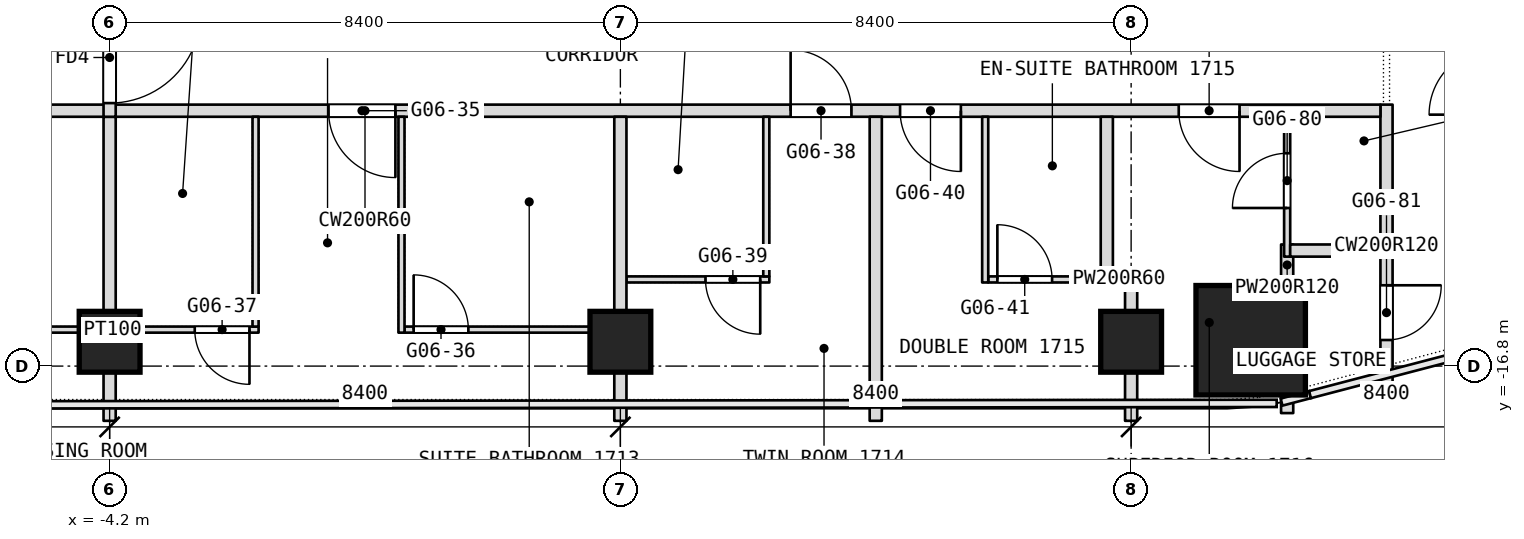
"""IFC4 building model, lengths in metres.
Left out: names, types, materials, properties, quantities, classifications, styles, units other than length and angle.
Written with IfcOpenShell. Run it as: python <this file> out.ifc"""

import sys

from ifc_helpers import new_model, si_unit, direction, frame, frame_2d, origin, origin_2d, place, context, subcontext, project, spatial, rectangle, extrude, element, fill, save


model = new_model("IFC4")
c1 = context("Model", 3, precision=1e-05, world=origin(), true_north=direction((0.0, 1.0)))
c2 = subcontext(c1, "Body", "Model", "MODEL_VIEW")
j1 = project(units=[si_unit("LENGTHUNIT", "METRE"), si_unit("PLANEANGLEUNIT", "RADIAN")], contexts=[c1])
p1 = place(None, origin())
s1 = spatial("IfcSite", under=j1, at=p1, CompositionType="ELEMENT")
p2 = place(p1, origin())
s2 = spatial("IfcBuilding", under=s1, at=p2, CompositionType="ELEMENT")
p3 = place(p2, frame((0.0, 0.0, 76.1)))
s3 = spatial("IfcBuildingStorey", under=s2, at=p3, CompositionType="ELEMENT", Elevation=76.1)
p4 = place(p3, frame((14.566, -16.375, 0.0), z_axis=(0.0, 0.0, 1.0), x_axis=(1.0, 0.0, 0.0)))
e1 = element("IfcColumn", 1, at=p4, inside=s3, PredefinedType="COLUMN", context=c2, shape_type="SweptSolid", body=[
    extrude(rectangle(XDim=1.8, YDim=1.8, at=origin_2d()), origin(), (0.0, 0.0, 1.0), 3.6),
])
for number, where, z_axis, x_axis in (
    (2, (12.6, -16.4, 0.0), (0.0, 0.0, 1.0), (1.0, 0.0, 0.0)),
    (3, (4.2, -16.4, 0.0), (0.0, 0.0, 1.0), (1.0, 0.0, 0.0)),
    (4, (-4.2, -16.4, 0.0), (0.0, 0.0, 1.0), (1.0, 0.0, 0.0)),
):
    element("IfcColumn", number, at=place(p3, frame(where, z_axis=z_axis, x_axis=x_axis)), inside=s3, PredefinedType="COLUMN", context=c2, shape_type="SweptSolid", body=[
        extrude(rectangle(XDim=1.0, YDim=1.0, at=origin_2d()), origin(), (0.0, 0.0, 1.0), 3.6),
    ])
p5 = place(p3, frame((16.8, -17.143, 0.0), z_axis=(0.0, 0.0, 1.0), x_axis=(0.0, 1.0, 0.0)))
e5 = element("IfcWall", 5, at=p5, inside=s3, PredefinedType="PARTITIONING", context=c2, shape_type="SweptSolid", body=[
    extrude(rectangle(XDim=4.643, YDim=0.2, at=frame_2d((2.322, 0.0))), origin(), (0.0, 0.0, 1.0), 3.34),
])
p6 = place(p5, frame((0.772, 0.0, 0.0)))
e6 = element("IfcOpeningElement", 6, at=p6, cuts=e5, PredefinedType="OPENING", context=c2, shape_type="SweptSolid", body=[
    extrude(rectangle(XDim=0.9, YDim=2.1, at=frame_2d((0.45, 1.05))), frame((0.0, 0.1, 0.0), z_axis=(0.0, -1.0, 0.0), x_axis=(1.0, 0.0, 0.0)), (0.0, 0.0, 1.0), 0.2),
])
p7 = place(p3, frame((-6.55, -16.2, 0.0), z_axis=(0.0, 0.0, 1.0), x_axis=(1.0, 0.0, 0.0)))
e7 = element("IfcWall", 7, at=p7, inside=s3, PredefinedType="PARTITIONING", context=c2, shape_type="SweptSolid", body=[
    extrude(rectangle(XDim=4.8, YDim=0.1, at=frame_2d((2.4, 0.0))), origin(), (0.0, 0.0, 1.0), 2.94),
])
p8 = place(p7, frame((0.15, 0.0, 0.0)))
e8 = element("IfcOpeningElement", 8, at=p8, cuts=e7, PredefinedType="OPENING", context=c2, shape_type="SweptSolid", body=[
    extrude(rectangle(XDim=0.9, YDim=2.1, at=frame_2d((0.45, 1.05))), frame((0.0, 0.05, 0.0), z_axis=(0.0, -1.0, 0.0), x_axis=(1.0, 0.0, 0.0)), (0.0, 0.0, 1.0), 0.1),
])
p9 = place(p7, frame((3.75, 0.0, 0.0)))
e9 = element("IfcOpeningElement", 9, at=p9, cuts=e7, PredefinedType="OPENING", context=c2, shape_type="SweptSolid", body=[
    extrude(rectangle(XDim=0.9, YDim=2.1, at=frame_2d((0.45, 1.05))), frame((0.0, 0.05, 0.0), z_axis=(0.0, -1.0, 0.0), x_axis=(1.0, 0.0, 0.0)), (0.0, 0.0, 1.0), 0.1),
])
p10 = place(p3, frame((0.65, -16.2, 0.0), z_axis=(0.0, 0.0, 1.0), x_axis=(1.0, 0.0, 0.0)))
e10 = element("IfcWall", 10, at=p10, inside=s3, PredefinedType="PARTITIONING", context=c2, shape_type="SweptSolid", body=[
    extrude(rectangle(XDim=3.65, YDim=0.1, at=frame_2d((1.825, 0.0))), origin(), (0.0, 0.0, 1.0), 2.94),
])
p11 = place(p10, frame((0.15, 0.0, 0.0)))
e11 = element("IfcOpeningElement", 11, at=p11, cuts=e10, PredefinedType="OPENING", context=c2, shape_type="SweptSolid", body=[
    extrude(rectangle(XDim=0.9, YDim=2.1, at=frame_2d((0.45, 1.05))), frame((0.0, 0.05, 0.0), z_axis=(0.0, -1.0, 0.0), x_axis=(1.0, 0.0, 0.0)), (0.0, 0.0, 1.0), 0.1),
])
p12 = place(p3, frame((4.3, -15.375, 0.0), z_axis=(0.0, 0.0, 1.0), x_axis=(1.0, 0.0, 0.0)))
e12 = element("IfcWall", 12, at=p12, inside=s3, PredefinedType="PARTITIONING", context=c2, shape_type="SweptSolid", body=[
    extrude(rectangle(XDim=2.35, YDim=0.1, at=frame_2d((1.175, 0.0))), origin(), (0.0, 0.0, 1.0), 3.34),
])
p13 = place(p12, frame((1.3, 0.0, 0.0)))
e13 = element("IfcOpeningElement", 13, at=p13, cuts=e12, PredefinedType="OPENING", context=c2, shape_type="SweptSolid", body=[
    extrude(rectangle(XDim=0.9, YDim=2.1, at=frame_2d((0.45, 1.05))), frame((0.0, 0.05, 0.0), z_axis=(0.0, -1.0, 0.0), x_axis=(1.0, 0.0, 0.0)), (0.0, 0.0, 1.0), 0.1),
])
p14 = place(p3, frame((10.25, -15.375, 0.0), z_axis=(0.0, 0.0, 1.0), x_axis=(1.0, 0.0, 0.0)))
e14 = element("IfcWall", 14, at=p14, inside=s3, PredefinedType="PARTITIONING", context=c2, shape_type="SweptSolid", body=[
    extrude(rectangle(XDim=2.05, YDim=0.1, at=frame_2d((1.025, 0.0))), origin(), (0.0, 0.0, 1.0), 3.34),
])
p15 = place(p14, frame((0.15, 0.0, 0.0)))
e15 = element("IfcOpeningElement", 15, at=p15, cuts=e14, PredefinedType="OPENING", context=c2, shape_type="SweptSolid", body=[
    extrude(rectangle(XDim=0.9, YDim=2.1, at=frame_2d((0.45, 1.05))), frame((0.0, 0.05, 0.0), z_axis=(0.0, -1.0, 0.0), x_axis=(1.0, 0.0, 0.0)), (0.0, 0.0, 1.0), 0.1),
])
p16 = place(p3, frame((12.1, -15.375, 0.0), z_axis=(0.0, 0.0, 1.0), x_axis=(1.0, 0.0, 0.0)))
e16 = element("IfcWall", 16, at=p16, inside=s3, PredefinedType="PARTITIONING", context=c2, shape_type="SweptSolid", body=[
    extrude(rectangle(XDim=0.6, YDim=0.2, at=frame_2d((0.3, 0.0))), origin(), (0.0, 0.0, 1.0), 3.34),
])
p17 = place(p3, frame((15.166, -17.573, 0.0), z_axis=(0.0, 0.0, 1.0), x_axis=(0.0, 1.0, 0.0)))
e17 = element("IfcWall", 17, at=p17, inside=s3, PredefinedType="PARTITIONING", context=c2, shape_type="SweptSolid", body=[
    extrude(rectangle(XDim=0.298, YDim=0.2, at=frame_2d((0.149, 0.0))), origin(), (0.0, 0.0, 1.0), 3.34),
])
p18 = place(p3, frame((15.166, -15.475, 0.0), z_axis=(0.0, 0.0, 1.0), x_axis=(0.0, 1.0, 0.0)))
e18 = element("IfcWall", 18, at=p18, inside=s3, PredefinedType="PARTITIONING", context=c2, shape_type="SweptSolid", body=[
    extrude(rectangle(XDim=0.675, YDim=0.2, at=frame_2d((0.337, 0.0))), origin(), (0.0, 0.0, 1.0), 3.34),
])
p19 = place(p3, frame((15.166, -15.0, 0.0), z_axis=(0.0, 0.0, 1.0), x_axis=(0.0, 1.0, 0.0)))
e19 = element("IfcWall", 19, at=p19, inside=s3, PredefinedType="PARTITIONING", context=c2, shape_type="SweptSolid", body=[
    extrude(rectangle(XDim=2.3, YDim=0.1, at=frame_2d((1.15, 0.0))), origin(), (0.0, 0.0, 1.0), 3.34),
])
p20 = place(p19, frame((0.8, 0.0, 0.0)))
e20 = element("IfcOpeningElement", 20, at=p20, cuts=e19, PredefinedType="OPENING", context=c2, shape_type="SweptSolid", body=[
    extrude(rectangle(XDim=0.9, YDim=2.1, at=frame_2d((0.45, 1.05))), frame((0.0, 0.05, 0.0), z_axis=(0.0, -1.0, 0.0), x_axis=(1.0, 0.0, 0.0)), (0.0, 0.0, 1.0), 0.1),
])
p21 = place(p3, frame((15.216, -14.9, 0.0), z_axis=(0.0, 0.0, 1.0), x_axis=(1.0, 0.0, 0.0)))
e21 = element("IfcWall", 21, at=p21, inside=s3, PredefinedType="PARTITIONING", context=c2, shape_type="SweptSolid", body=[
    extrude(rectangle(XDim=1.484, YDim=0.2, at=frame_2d((0.742, 0.0))), origin(), (0.0, 0.0, 1.0), 3.34),
])
p22 = place(p3, frame((12.6, -17.7, 0.0), z_axis=(0.0, 0.0, 1.0), x_axis=(0.0, 1.0, 0.0)))
e22 = element("IfcWall", 22, at=p22, inside=s3, PredefinedType="PARTITIONING", context=c2, shape_type="SweptSolid", body=[
    extrude(rectangle(XDim=2.225, YDim=0.2, at=frame_2d((1.112, 0.0))), origin(), (0.0, 0.0, 1.0), 3.34),
])
p23 = place(p3, frame((-16.7, -12.6, 0.0), z_axis=(0.0, 0.0, 1.0), x_axis=(1.0, 0.0, 0.0)))
e23 = element("IfcWall", 23, at=p23, inside=s3, PredefinedType="PARTITIONING", context=c2, shape_type="SweptSolid", body=[
    extrude(rectangle(XDim=33.4, YDim=0.2, at=frame_2d((16.7, 0.0))), origin(), (0.0, 0.0, 1.0), 3.34),
])
p24 = place(p23, frame((7.8, 0.0, 0.0)))
e24 = element("IfcOpeningElement", 24, at=p24, cuts=e23, PredefinedType="OPENING", context=c2, shape_type="SweptSolid", body=[
    extrude(rectangle(XDim=1.1, YDim=2.1, at=frame_2d((0.55, 1.05))), frame((0.0, 0.1, 0.0), z_axis=(0.0, -1.0, 0.0), x_axis=(1.0, 0.0, 0.0)), (0.0, 0.0, 1.0), 0.2),
])
p25 = place(p23, frame((16.1, 0.0, 0.0)))
e25 = element("IfcOpeningElement", 25, at=p25, cuts=e23, PredefinedType="OPENING", context=c2, shape_type="SweptSolid", body=[
    extrude(rectangle(XDim=1.1, YDim=2.1, at=frame_2d((0.55, 1.05))), frame((0.0, 0.1, 0.0), z_axis=(0.0, -1.0, 0.0), x_axis=(1.0, 0.0, 0.0)), (0.0, 0.0, 1.0), 0.2),
])
p26 = place(p23, frame((23.7, 0.0, 0.0)))
e26 = element("IfcOpeningElement", 26, at=p26, cuts=e23, PredefinedType="OPENING", context=c2, shape_type="SweptSolid", body=[
    extrude(rectangle(XDim=1.0, YDim=2.1, at=frame_2d((0.5, 1.05))), frame((0.0, 0.1, 0.0), z_axis=(0.0, -1.0, 0.0), x_axis=(1.0, 0.0, 0.0)), (0.0, 0.0, 1.0), 0.2),
])
p27 = place(p23, frame((25.5, 0.0, 0.0)))
e27 = element("IfcOpeningElement", 27, at=p27, cuts=e23, PredefinedType="OPENING", context=c2, shape_type="SweptSolid", body=[
    extrude(rectangle(XDim=1.0, YDim=2.1, at=frame_2d((0.5, 1.05))), frame((0.0, 0.1, 0.0), z_axis=(0.0, -1.0, 0.0), x_axis=(1.0, 0.0, 0.0)), (0.0, 0.0, 1.0), 0.2),
])
p28 = place(p23, frame((2.367, 0.0, 0.0)))
e28 = element("IfcOpeningElement", 28, at=p28, cuts=e23, PredefinedType="OPENING", context=c2, shape_type="SweptSolid", body=[
    extrude(rectangle(XDim=1.0, YDim=2.1, at=frame_2d((0.5, 1.05))), frame((0.0, 0.1, 0.0), z_axis=(0.0, -1.0, 0.0), x_axis=(1.0, 0.0, 0.0)), (0.0, 0.0, 1.0), 0.2),
])
p29 = place(p23, frame((30.083, 0.0, 0.0)))
e29 = element("IfcOpeningElement", 29, at=p29, cuts=e23, PredefinedType="OPENING", context=c2, shape_type="SweptSolid", body=[
    extrude(rectangle(XDim=1.0, YDim=2.1, at=frame_2d((0.5, 1.05))), frame((0.0, 0.1, 0.0), z_axis=(0.0, -1.0, 0.0), x_axis=(1.0, 0.0, 0.0)), (0.0, 0.0, 1.0), 0.2),
])
p30 = place(p3, frame((12.2, -15.325, 0.0), z_axis=(0.0, 0.0, 1.0), x_axis=(0.0, 1.0, 0.0)))
e30 = element("IfcWall", 30, at=p30, inside=s3, PredefinedType="PARTITIONING", context=c2, shape_type="SweptSolid", body=[
    extrude(rectangle(XDim=2.625, YDim=0.2, at=frame_2d((1.312, 0.0))), origin(), (0.0, 0.0, 1.0), 3.34),
])
p31 = place(p3, frame((10.2, -15.425, 0.0), z_axis=(0.0, 0.0, 1.0), x_axis=(0.0, 1.0, 0.0)))
e31 = element("IfcWall", 31, at=p31, inside=s3, PredefinedType="PARTITIONING", context=c2, shape_type="SweptSolid", body=[
    extrude(rectangle(XDim=2.725, YDim=0.1, at=frame_2d((1.363, 0.0))), origin(), (0.0, 0.0, 1.0), 3.34),
])
p32 = place(p3, frame((8.4, -17.7, 0.0), z_axis=(0.0, 0.0, 1.0), x_axis=(0.0, 1.0, 0.0)))
e32 = element("IfcWall", 32, at=p32, inside=s3, PredefinedType="PARTITIONING", context=c2, shape_type="SweptSolid", body=[
    extrude(rectangle(XDim=5.0, YDim=0.2, at=frame_2d((2.5, 0.0))), origin(), (0.0, 0.0, 1.0), 3.34),
])
p33 = place(p3, frame((6.6, -15.325, 0.0), z_axis=(0.0, 0.0, 1.0), x_axis=(0.0, 1.0, 0.0)))
e33 = element("IfcWall", 33, at=p33, inside=s3, PredefinedType="PARTITIONING", context=c2, shape_type="SweptSolid", body=[
    extrude(rectangle(XDim=2.625, YDim=0.1, at=frame_2d((1.312, 0.0))), origin(), (0.0, 0.0, 1.0), 3.34),
])
p34 = place(p3, frame((4.2, -17.7, 0.0), z_axis=(0.0, 0.0, 1.0), x_axis=(0.0, 1.0, 0.0)))
e34 = element("IfcWall", 34, at=p34, inside=s3, PredefinedType="PARTITIONING", context=c2, shape_type="SweptSolid", body=[
    extrude(rectangle(XDim=5.0, YDim=0.2, at=frame_2d((2.5, 0.0))), origin(), (0.0, 0.0, 1.0), 3.34),
])
p35 = place(p3, frame((0.6, -16.25, 0.0), z_axis=(0.0, 0.0, 1.0), x_axis=(0.0, 1.0, 0.0)))
e35 = element("IfcWall", 35, at=p35, inside=s3, PredefinedType="PARTITIONING", context=c2, shape_type="SweptSolid", body=[
    extrude(rectangle(XDim=3.55, YDim=0.1, at=frame_2d((1.775, 0.0))), origin(), (0.0, 0.0, 1.0), 3.34),
])
p36 = place(p3, frame((-1.8, -16.15, 0.0), z_axis=(0.0, 0.0, 1.0), x_axis=(0.0, 1.0, 0.0)))
e36 = element("IfcWall", 36, at=p36, inside=s3, PredefinedType="PARTITIONING", context=c2, shape_type="SweptSolid", body=[
    extrude(rectangle(XDim=3.45, YDim=0.1, at=frame_2d((1.725, 0.0))), origin(), (0.0, 0.0, 1.0), 3.34),
])
p37 = place(p3, frame((-4.2, -17.7, 0.0), z_axis=(0.0, 0.0, 1.0), x_axis=(0.0, 1.0, 0.0)))
e37 = element("IfcWall", 37, at=p37, inside=s3, PredefinedType="PARTITIONING", context=c2, shape_type="SweptSolid", body=[
    extrude(rectangle(XDim=5.0, YDim=0.2, at=frame_2d((2.5, 0.0))), origin(), (0.0, 0.0, 1.0), 3.34),
])
p38 = place(p3, frame((-4.2, -12.7, 0.0), z_axis=(0.0, 0.0, 1.0), x_axis=(0.0, 1.0, 0.0)))
e38 = element("IfcWall", 38, at=p38, inside=s3, PredefinedType="PARTITIONING", context=c2, shape_type="SweptSolid", body=[
    extrude(rectangle(XDim=12.7, YDim=0.2, at=frame_2d((6.35, 0.0))), origin(), (0.0, 0.0, 1.0), 3.34),
])
p39 = place(p38, frame((11.05, 0.0, 0.0)))
e39 = element("IfcOpeningElement", 39, at=p39, cuts=e38, PredefinedType="OPENING", context=c2, shape_type="SweptSolid", body=[
    extrude(rectangle(XDim=1.5, YDim=2.1, at=frame_2d((0.75, 1.05))), frame((0.0, 0.1, 0.0), z_axis=(0.0, -1.0, 0.0), x_axis=(1.0, 0.0, 0.0)), (0.0, 0.0, 1.0), 0.2),
])
p40 = place(p38, frame((0.225, 0.0, 0.0)))
e40 = element("IfcOpeningElement", 40, at=p40, cuts=e38, PredefinedType="OPENING", context=c2, shape_type="SweptSolid", body=[
    extrude(rectangle(XDim=1.5, YDim=2.1, at=frame_2d((0.75, 1.05))), frame((0.0, 0.1, 0.0), z_axis=(0.0, -1.0, 0.0), x_axis=(1.0, 0.0, 0.0)), (0.0, 0.0, 1.0), 0.2),
])
p41 = place(p6, origin())
e41 = element("IfcDoor", 41, at=p41, inside=s3, OperationType="SINGLE_SWING_RIGHT", PredefinedType="DOOR", context=c2, shape_type="SweptSolid", body=[
    extrude(rectangle(XDim=0.9, YDim=2.1, at=frame_2d((0.45, 1.05))), frame((0.0, 0.025, 0.0), z_axis=(0.0, -1.0, 0.0), x_axis=(1.0, 0.0, 0.0)), (0.0, 0.0, 1.0), 0.05),
])
fill(e6, e41)
p42 = place(p9, origin())
e42 = element("IfcDoor", 42, at=p42, inside=s3, OperationType="SINGLE_SWING_RIGHT", PredefinedType="DOOR", context=c2, shape_type="SweptSolid", body=[
    extrude(rectangle(XDim=0.9, YDim=2.1, at=frame_2d((0.45, 1.05))), frame((0.0, 0.025, 0.0), z_axis=(0.0, -1.0, 0.0), x_axis=(1.0, 0.0, 0.0)), (0.0, 0.0, 1.0), 0.05),
])
fill(e9, e42)
p43 = place(p11, origin())
e43 = element("IfcDoor", 43, at=p43, inside=s3, OperationType="SINGLE_SWING_LEFT", PredefinedType="DOOR", context=c2, shape_type="SweptSolid", body=[
    extrude(rectangle(XDim=0.9, YDim=2.1, at=frame_2d((0.45, 1.05))), frame((0.0, 0.025, 0.0), z_axis=(0.0, -1.0, 0.0), x_axis=(1.0, 0.0, 0.0)), (0.0, 0.0, 1.0), 0.05),
])
fill(e11, e43)
p44 = place(p13, origin())
e44 = element("IfcDoor", 44, at=p44, inside=s3, OperationType="SINGLE_SWING_RIGHT", PredefinedType="DOOR", context=c2, shape_type="SweptSolid", body=[
    extrude(rectangle(XDim=0.9, YDim=2.1, at=frame_2d((0.45, 1.05))), frame((0.0, 0.025, 0.0), z_axis=(0.0, -1.0, 0.0), x_axis=(1.0, 0.0, 0.0)), (0.0, 0.0, 1.0), 0.05),
])
fill(e13, e44)
p45 = place(p15, origin())
e45 = element("IfcDoor", 45, at=p45, inside=s3, OperationType="SINGLE_SWING_LEFT", PredefinedType="DOOR", context=c2, shape_type="SweptSolid", body=[
    extrude(rectangle(XDim=0.9, YDim=2.1, at=frame_2d((0.45, 1.05))), frame((0.0, 0.025, 0.0), z_axis=(0.0, -1.0, 0.0), x_axis=(1.0, 0.0, 0.0)), (0.0, 0.0, 1.0), 0.05),
])
fill(e15, e45)
p46 = place(p20, origin())
e46 = element("IfcDoor", 46, at=p46, inside=s3, OperationType="SINGLE_SWING_RIGHT", PredefinedType="DOOR", context=c2, shape_type="SweptSolid", body=[
    extrude(rectangle(XDim=0.9, YDim=2.1, at=frame_2d((0.45, 1.05))), frame((0.0, 0.025, 0.0), z_axis=(0.0, -1.0, 0.0), x_axis=(1.0, 0.0, 0.0)), (0.0, 0.0, 1.0), 0.05),
])
fill(e20, e46)
p47 = place(p25, origin())
e47 = element("IfcDoor", 47, at=p47, inside=s3, OperationType="SINGLE_SWING_LEFT", PredefinedType="DOOR", context=c2, shape_type="SweptSolid", body=[
    extrude(rectangle(XDim=1.1, YDim=2.1, at=frame_2d((0.55, 1.05))), frame((0.0, 0.025, 0.0), z_axis=(0.0, -1.0, 0.0), x_axis=(1.0, 0.0, 0.0)), (0.0, 0.0, 1.0), 0.05),
])
fill(e25, e47)
p48 = place(p26, origin())
e48 = element("IfcDoor", 48, at=p48, inside=s3, OperationType="SINGLE_SWING_RIGHT", PredefinedType="DOOR", context=c2, shape_type="SweptSolid", body=[
    extrude(rectangle(XDim=1.0, YDim=2.1, at=frame_2d((0.5, 1.05))), frame((0.0, 0.025, 0.0), z_axis=(0.0, -1.0, 0.0), x_axis=(1.0, 0.0, 0.0)), (0.0, 0.0, 1.0), 0.05),
])
fill(e26, e48)
p49 = place(p27, origin())
e49 = element("IfcDoor", 49, at=p49, inside=s3, OperationType="SINGLE_SWING_RIGHT", PredefinedType="DOOR", context=c2, shape_type="SweptSolid", body=[
    extrude(rectangle(XDim=1.0, YDim=2.1, at=frame_2d((0.5, 1.05))), frame((0.0, 0.025, 0.0), z_axis=(0.0, -1.0, 0.0), x_axis=(1.0, 0.0, 0.0)), (0.0, 0.0, 1.0), 0.05),
])
fill(e27, e49)
p50 = place(p29, origin())
e50 = element("IfcDoor", 50, at=p50, inside=s3, OperationType="SINGLE_SWING_LEFT", PredefinedType="DOOR", context=c2, shape_type="SweptSolid", body=[
    extrude(rectangle(XDim=1.0, YDim=2.1, at=frame_2d((0.5, 1.05))), frame((0.0, 0.025, 0.0), z_axis=(0.0, -1.0, 0.0), x_axis=(1.0, 0.0, 0.0)), (0.0, 0.0, 1.0), 0.05),
])
fill(e29, e50)
p51 = place(p40, origin())
e51 = element("IfcDoor", 51, at=p51, inside=s3, OperationType="DOUBLE_DOOR_DOUBLE_SWING", PredefinedType="DOOR", context=c2, shape_type="SweptSolid", body=[
    extrude(rectangle(XDim=1.5, YDim=2.1, at=frame_2d((0.75, 1.05))), frame((0.0, 0.025, 0.0), z_axis=(0.0, -1.0, 0.0), x_axis=(1.0, 0.0, 0.0)), (0.0, 0.0, 1.0), 0.05),
])
fill(e40, e51)
save(model, sys.argv[1])
